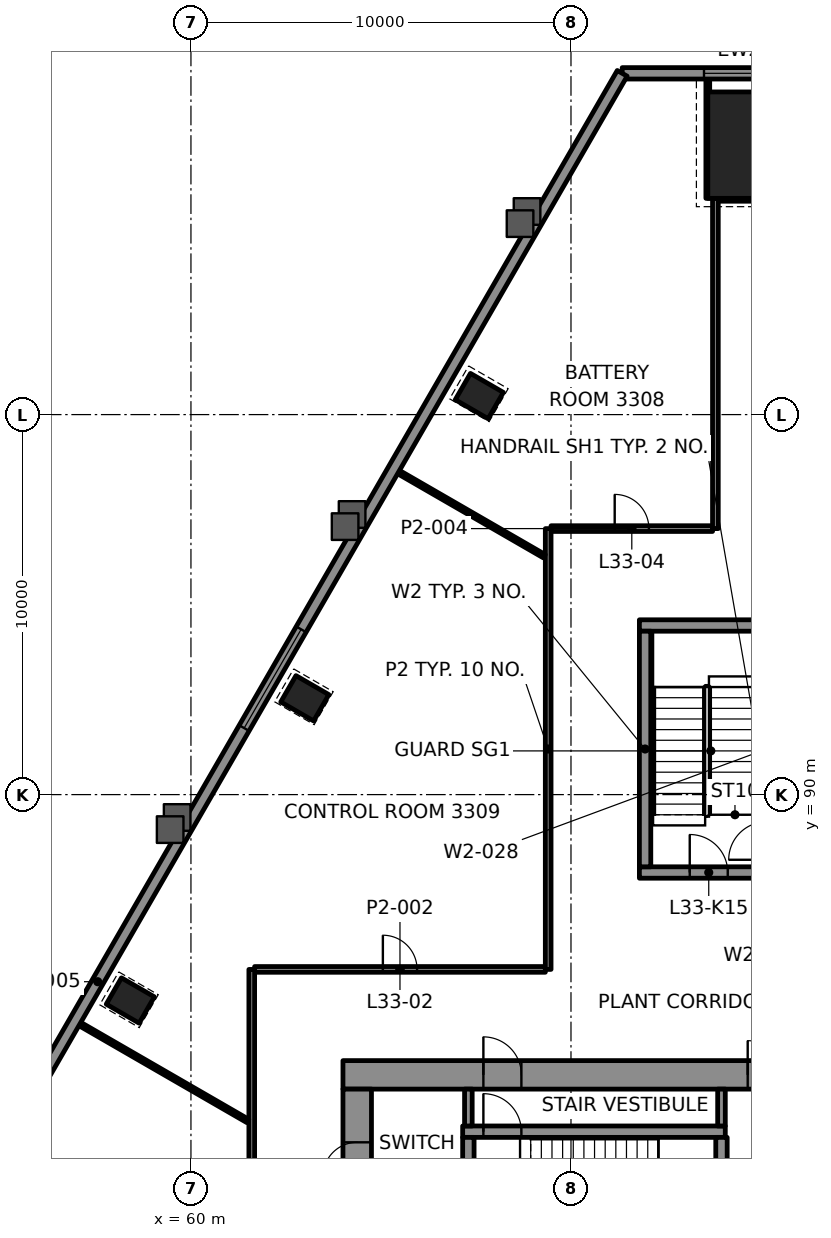
"""IFC4 building model, lengths in metres.
Left out: names, types, materials, properties, quantities, classifications, styles, units other than length and angle.
Written with IfcOpenShell. Run it as: python <this file> out.ifc"""

import sys

from ifc_helpers import new_model, si_unit, direction, frame, frame_2d, origin, origin_2d, place, context, subcontext, project, spatial, rectangle, hollow_rectangle, extrude, element, fill, save


model = new_model("IFC4")
c1 = context("Model", 3, precision=1e-05, world=origin(), true_north=direction((0.0, 1.0)))
c2 = subcontext(c1, "Body", "Model", "MODEL_VIEW")
j1 = project(units=[si_unit("LENGTHUNIT", "METRE"), si_unit("PLANEANGLEUNIT", "RADIAN")], contexts=[c1])
p1 = place(None, origin())
s1 = spatial("IfcSite", under=j1, at=p1, CompositionType="ELEMENT")
p2 = place(p1, origin())
s2 = spatial("IfcBuilding", under=s1, at=p2, CompositionType="ELEMENT")
p3 = place(p2, frame((0.0, 0.0, 146.8)))
s3 = spatial("IfcBuildingStorey", under=s2, at=p3, CompositionType="ELEMENT", Elevation=146.8)
p4 = place(p3, frame((75.0, 107.091, 0.0), z_axis=(0.0, 0.0, 1.0), x_axis=(-1.0, 0.0, 0.0)))
e1 = element("IfcColumn", 1, at=p4, inside=s3, PredefinedType="COLUMN", context=c2, shape_type="SweptSolid", body=[
    extrude(rectangle(XDim=2.8, YDim=2.8, at=origin_2d()), origin(), (0.0, 0.0, 1.0), 4.5),
])
for number, where, z_axis, x_axis in (
    (2, (67.588, 100.488, -0.0), (0.0, 0.0, 1.0), (-0.5, -0.866, 0.0)),
    (3, (62.996, 92.534, -0.0), (0.0, 0.0, 1.0), (-0.5, -0.866, 0.0)),
    (4, (58.405, 84.582, -0.0), (0.0, 0.0, 1.0), (-0.5, -0.866, 0.0)),
):
    element("IfcColumn", number, at=place(p3, frame(where, z_axis=z_axis, x_axis=x_axis)), inside=s3, PredefinedType="COLUMN", context=c2, shape_type="SweptSolid", body=[
        extrude(hollow_rectangle(XDim=0.8, YDim=1.0, WallThickness=0.05, at=origin_2d()), origin(), (0.0, 0.0, 1.0), 4.5),
    ])
p5 = place(p3, frame((64.0, 82.625, 0.0), z_axis=(0.0, 0.0, 1.0), x_axis=(1.0, 0.0, 0.0)))
e5 = element("IfcWall", 5, at=p5, inside=s3, PredefinedType="SHEAR", context=c2, shape_type="SweptSolid", body=[
    extrude(rectangle(XDim=22.0, YDim=0.75, at=frame_2d((11.0, 0.0))), origin(), (0.0, 0.0, 1.0), 4.05),
])
p6 = place(p5, frame((3.695, 0.0, 0.0)))
e6 = element("IfcOpeningElement", 6, at=p6, cuts=e5, PredefinedType="OPENING", context=c2, shape_type="SweptSolid", body=[
    extrude(rectangle(XDim=1.0, YDim=2.1, at=frame_2d((0.5, 1.05))), frame((0.0, 0.385, 0.0), z_axis=(0.0, -1.0, 0.0), x_axis=(1.0, 0.0, 0.0)), (0.0, 0.0, 1.0), 0.77),
])
p7 = place(p5, frame((17.505, 0.0, 0.0)))
e7 = element("IfcOpeningElement", 7, at=p7, cuts=e5, PredefinedType="OPENING", context=c2, shape_type="SweptSolid", body=[
    extrude(rectangle(XDim=1.0, YDim=2.1, at=frame_2d((0.5, 1.05))), frame((0.0, 0.385, 0.0), z_axis=(0.0, -1.0, 0.0), x_axis=(1.0, 0.0, 0.0)), (0.0, 0.0, 1.0), 0.77),
])
p8 = place(p5, frame((10.65, 0.0, 0.0)))
e8 = element("IfcOpeningElement", 8, at=p8, cuts=e5, PredefinedType="OPENING", context=c2, shape_type="SweptSolid", body=[
    extrude(rectangle(XDim=0.9, YDim=2.1, at=frame_2d((0.45, 1.05))), frame((0.0, 0.385, 0.0), z_axis=(0.0, -1.0, 0.0), x_axis=(1.0, 0.0, 0.0)), (0.0, 0.0, 1.0), 0.77),
])
p9 = place(p3, frame((64.375, 67.75, 0.0), z_axis=(0.0, 0.0, 1.0), x_axis=(0.0, 1.0, 0.0)))
e9 = element("IfcWall", 9, at=p9, inside=s3, PredefinedType="SHEAR", context=c2, shape_type="SweptSolid", body=[
    extrude(rectangle(XDim=14.5, YDim=0.75, at=frame_2d((7.25, 0.0))), origin(), (0.0, 0.0, 1.0), 4.05),
])
p10 = place(p9, frame((4.65, 0.0, 0.0)))
e10 = element("IfcOpeningElement", 10, at=p10, cuts=e9, PredefinedType="OPENING", context=c2, shape_type="SweptSolid", body=[
    extrude(rectangle(XDim=1.8, YDim=2.1, at=frame_2d((0.9, 1.05))), frame((0.0, 0.385, 0.0), z_axis=(0.0, -1.0, 0.0), x_axis=(1.0, 0.0, 0.0)), (0.0, 0.0, 1.0), 0.77),
])
p11 = place(p9, frame((8.5, 0.0, 0.0)))
e11 = element("IfcOpeningElement", 11, at=p11, cuts=e9, PredefinedType="OPENING", context=c2, shape_type="SweptSolid", body=[
    extrude(rectangle(XDim=0.9, YDim=2.1, at=frame_2d((0.45, 1.05))), frame((0.0, 0.385, 0.0), z_axis=(0.0, -1.0, 0.0), x_axis=(1.0, 0.0, 0.0)), (0.0, 0.0, 1.0), 0.77),
])
p12 = place(p9, frame((12.2, 0.0, 0.0)))
e12 = element("IfcOpeningElement", 12, at=p12, cuts=e9, PredefinedType="OPENING", context=c2, shape_type="SweptSolid", body=[
    extrude(rectangle(XDim=0.9, YDim=2.1, at=frame_2d((0.45, 1.05))), frame((0.0, 0.385, 0.0), z_axis=(0.0, -1.0, 0.0), x_axis=(1.0, 0.0, 0.0)), (0.0, 0.0, 1.0), 0.77),
])
p13 = place(p3, frame((67.15, 81.13, 0.0), z_axis=(0.0, 0.0, 1.0), x_axis=(1.0, 0.0, 0.0)))
e13 = element("IfcWall", 13, at=p13, inside=s3, PredefinedType="SHEAR", context=c2, shape_type="SweptSolid", body=[
    extrude(rectangle(XDim=6.91, YDim=0.3, at=frame_2d((3.455, 0.0))), origin(), (0.0, 0.0, 1.0), 4.05),
])
p14 = place(p13, frame((0.545, 0.0, 0.0)))
e14 = element("IfcOpeningElement", 14, at=p14, cuts=e13, PredefinedType="OPENING", context=c2, shape_type="SweptSolid", body=[
    extrude(rectangle(XDim=1.0, YDim=2.1, at=frame_2d((0.5, 1.05))), frame((0.0, 0.16, 0.0), z_axis=(0.0, -1.0, 0.0), x_axis=(1.0, 0.0, 0.0)), (0.0, 0.0, 1.0), 0.32),
])
for number, where, z_axis, x_axis in (
    (15, (67.3, 77.9, 0.0), (0.0, 0.0, 1.0), (0.0, 1.0, 0.0)),
    (16, (73.96, 77.9, 0.0), (0.0, 0.0, 1.0), (0.0, 1.0, 0.0)),
):
    element("IfcWall", number, at=place(p3, frame(where, z_axis=z_axis, x_axis=x_axis)), inside=s3, PredefinedType="SHEAR", context=c2, shape_type="SweptSolid", body=[
        extrude(rectangle(XDim=3.08, YDim=0.3, at=frame_2d((1.54, 0.0))), origin(), (0.0, 0.0, 1.0), 4.05),
    ])
p15 = place(p3, frame((71.8, 87.95, 0.0), z_axis=(0.0, 0.0, 1.0), x_axis=(1.0, 0.0, 0.0)))
e17 = element("IfcWall", 17, at=p15, inside=s3, PredefinedType="SHEAR", context=c2, shape_type="SweptSolid", body=[
    extrude(rectangle(XDim=6.4, YDim=0.3, at=frame_2d((3.2, 0.0))), origin(), (0.0, 0.0, 1.0), 4.05),
])
p16 = place(p15, frame((1.325, 0.0, 0.0)))
e18 = element("IfcOpeningElement", 18, at=p16, cuts=e17, PredefinedType="OPENING", context=c2, shape_type="SweptSolid", body=[
    extrude(rectangle(XDim=1.0, YDim=2.1, at=frame_2d((0.5, 1.05))), frame((0.0, 0.16, 0.0), z_axis=(0.0, -1.0, 0.0), x_axis=(1.0, 0.0, 0.0)), (0.0, 0.0, 1.0), 0.32),
])
p17 = place(p15, frame((4.125, 0.0, 0.0)))
e19 = element("IfcOpeningElement", 19, at=p17, cuts=e17, PredefinedType="OPENING", context=c2, shape_type="SweptSolid", body=[
    extrude(rectangle(XDim=1.2, YDim=2.1, at=frame_2d((0.6, 1.05))), frame((0.0, 0.16, 0.0), z_axis=(0.0, -1.0, 0.0), x_axis=(1.0, 0.0, 0.0)), (0.0, 0.0, 1.0), 0.32),
])
p18 = place(p3, frame((71.8, 94.45, 0.0), z_axis=(0.0, 0.0, 1.0), x_axis=(1.0, 0.0, 0.0)))
e20 = element("IfcWall", 20, at=p18, inside=s3, PredefinedType="SHEAR", context=c2, shape_type="SweptSolid", body=[
    extrude(rectangle(XDim=6.4, YDim=0.3, at=frame_2d((3.2, 0.0))), origin(), (0.0, 0.0, 1.0), 4.05),
])
p19 = place(p3, frame((71.95, 88.1, 0.0), z_axis=(0.0, 0.0, 1.0), x_axis=(0.0, 1.0, 0.0)))
e21 = element("IfcWall", 21, at=p19, inside=s3, PredefinedType="SHEAR", context=c2, shape_type="SweptSolid", body=[
    extrude(rectangle(XDim=6.2, YDim=0.3, at=frame_2d((3.1, 0.0))), origin(), (0.0, 0.0, 1.0), 4.05),
])
p20 = place(p3, frame((61.676, 85.4, 0.0), z_axis=(0.0, 0.0, 1.0), x_axis=(1.0, 0.0, 0.0)))
e22 = element("IfcWall", 22, at=p20, inside=s3, PredefinedType="PARTITIONING", context=c2, shape_type="SweptSolid", body=[
    extrude(rectangle(XDim=7.649, YDim=0.15, at=frame_2d((3.825, 0.0))), origin(), (0.0, 0.0, 1.0), 3.45),
])
p21 = place(p20, frame((3.375, 0.0, 0.0)))
e23 = element("IfcOpeningElement", 23, at=p21, cuts=e22, PredefinedType="OPENING", context=c2, shape_type="SweptSolid", body=[
    extrude(rectangle(XDim=0.9, YDim=2.1, at=frame_2d((0.45, 1.05))), frame((0.0, 0.085, 0.0), z_axis=(0.0, -1.0, 0.0), x_axis=(1.0, 0.0, 0.0)), (0.0, 0.0, 1.0), 0.17),
])
p22 = place(p3, frame((69.476, 97.0, 0.0), z_axis=(0.0, 0.0, 1.0), x_axis=(1.0, 0.0, 0.0)))
e24 = element("IfcWall", 24, at=p22, inside=s3, PredefinedType="PARTITIONING", context=c2, shape_type="SweptSolid", body=[
    extrude(rectangle(XDim=4.25, YDim=0.15, at=frame_2d((2.125, 0.0))), origin(), (0.0, 0.0, 1.0), 3.45),
])
p23 = place(p22, frame((1.675, 0.0, 0.0)))
e25 = element("IfcOpeningElement", 25, at=p23, cuts=e24, PredefinedType="OPENING", context=c2, shape_type="SweptSolid", body=[
    extrude(rectangle(XDim=0.9, YDim=2.1, at=frame_2d((0.45, 1.05))), frame((0.0, 0.085, 0.0), z_axis=(0.0, -1.0, 0.0), x_axis=(1.0, 0.0, 0.0)), (0.0, 0.0, 1.0), 0.17),
])
p24 = place(p3, frame((73.881, 105.69, 0.0), z_axis=(0.0, 0.0, 1.0), x_axis=(1.0, 0.0, 0.0)))
e26 = element("IfcWall", 26, at=p24, inside=s3, PredefinedType="PARTITIONING", context=c2, shape_type="SweptSolid", body=[
    extrude(rectangle(XDim=2.244, YDim=0.15, at=frame_2d((1.122, 0.0))), origin(), (0.0, 0.0, 1.0), 3.447),
])
p25 = place(p3, frame((73.8, 97.0, 0.0), z_axis=(0.0, 0.0, 1.0), x_axis=(0.0, 1.0, 0.0)))
e27 = element("IfcWall", 27, at=p25, inside=s3, PredefinedType="PARTITIONING", context=c2, shape_type="SweptSolid", body=[
    extrude(rectangle(XDim=8.69, YDim=0.15, at=frame_2d((4.345, 0.0))), origin(), (0.0, 0.0, 1.0), 3.45),
])
p26 = place(p3, frame((73.6, 105.691, 0.0), z_axis=(0.0, 0.0, 1.0), x_axis=(0.0, 1.0, 0.0)))
e28 = element("IfcWall", 28, at=p26, inside=s3, PredefinedType="PARTITIONING", context=c2, shape_type="SweptSolid", body=[
    extrude(rectangle(XDim=3.258, YDim=0.1, at=frame_2d((1.629, 0.0))), origin(), (0.0, 0.0, 1.0), 3.45),
])
p27 = place(p3, frame((69.4, 85.4, 0.0), z_axis=(0.0, 0.0, 1.0), x_axis=(0.0, 1.0, 0.0)))
e29 = element("IfcWall", 29, at=p27, inside=s3, PredefinedType="PARTITIONING", context=c2, shape_type="SweptSolid", body=[
    extrude(rectangle(XDim=11.6, YDim=0.15, at=frame_2d((5.8, 0.0))), origin(), (0.0, 0.0, 1.0), 3.372),
])
p28 = place(p3, frame((61.6, 68.649, 0.0), z_axis=(0.0, 0.0, 1.0), x_axis=(0.0, 1.0, 0.0)))
e30 = element("IfcWall", 30, at=p28, inside=s3, PredefinedType="PARTITIONING", context=c2, shape_type="SweptSolid", body=[
    extrude(rectangle(XDim=16.75, YDim=0.15, at=frame_2d((8.375, 0.0))), origin(), (0.0, 0.0, 1.0), 3.45),
])
p29 = place(p28, frame((6.722, 0.0, 0.0)))
e31 = element("IfcOpeningElement", 31, at=p29, cuts=e30, PredefinedType="OPENING", context=c2, shape_type="SweptSolid", body=[
    extrude(rectangle(XDim=0.9, YDim=2.1, at=frame_2d((0.45, 1.05))), frame((0.0, 0.085, 0.0), z_axis=(0.0, -1.0, 0.0), x_axis=(1.0, 0.0, 0.0)), (0.0, 0.0, 1.0), 0.17),
])
p30 = place(p3, frame((69.299, 96.272, 0.0), z_axis=(0.0, 0.0, 1.0), x_axis=(-0.866008641419, 0.500029032144, 0.0)))
e32 = element("IfcWall", 32, at=p30, inside=s3, PredefinedType="PARTITIONING", context=c2, shape_type="SweptSolid", body=[
    extrude(rectangle(XDim=4.55, YDim=0.1, at=frame_2d((2.275, 0.0))), origin(), (0.0, 0.0, 1.0), 3.215),
])
p31 = place(p3, frame((61.498, 81.41, 0.0), z_axis=(0.0, 0.0, 1.0), x_axis=(-0.866017510603, 0.500013671143, 0.0)))
e33 = element("IfcWall", 33, at=p31, inside=s3, PredefinedType="PARTITIONING", context=c2, shape_type="SweptSolid", body=[
    extrude(rectangle(XDim=5.225, YDim=0.1, at=frame_2d((2.612, 0.0))), origin(), (0.0, 0.0, 1.0), 3.215),
])
p32 = place(p3, frame((78.652, 108.98, 0.0), z_axis=(0.0, 0.0, 1.0), x_axis=(-1.0, 0.0, 0.0)))
e34 = element("IfcWall", 34, at=p32, inside=s3, PredefinedType="SOLIDWALL", context=c2, shape_type="SweptSolid", body=[
    extrude(rectangle(XDim=7.304, YDim=0.3, at=frame_2d((3.652, 0.0))), origin(), (0.0, 0.0, 1.0), 4.05),
])
p33 = place(p32, frame((2.152, 0.0, 0.8)))
e35 = element("IfcOpeningElement", 35, at=p33, cuts=e34, PredefinedType="OPENING", context=c2, shape_type="SweptSolid", body=[
    extrude(rectangle(XDim=3.0, YDim=2.4, at=frame_2d((1.5, 1.2))), frame((0.0, 0.16, 0.0), z_axis=(0.0, -1.0, 0.0), x_axis=(1.0, 0.0, 0.0)), (0.0, 0.0, 1.0), 0.32),
])
p34 = place(p3, frame((71.348, 108.98, 0.0), z_axis=(0.0, 0.0, 1.0), x_axis=(-0.500000383388, -0.866025182435, 0.0)))
e36 = element("IfcWall", 36, at=p34, inside=s3, PredefinedType="SOLIDWALL", context=c2, shape_type="SweptSolid", body=[
    extrude(rectangle(XDim=55.204, YDim=0.3, at=frame_2d((27.602, 0.0))), origin(), (0.0, 0.0, 1.0), 4.05),
])
p35 = place(p34, frame((16.895, 0.0, 0.8)))
e37 = element("IfcOpeningElement", 37, at=p35, cuts=e36, PredefinedType="OPENING", context=c2, shape_type="SweptSolid", body=[
    extrude(rectangle(XDim=3.0, YDim=2.4, at=frame_2d((1.5, 1.2))), frame((0.0, 0.16, 0.0), z_axis=(0.0, -1.0, 0.0), x_axis=(1.0, 0.0, 0.0)), (0.0, 0.0, 1.0), 0.32),
])
p36 = place(p34, frame((35.309, 0.0, 0.8)))
e38 = element("IfcOpeningElement", 38, at=p36, cuts=e36, PredefinedType="OPENING", context=c2, shape_type="SweptSolid", body=[
    extrude(rectangle(XDim=3.0, YDim=2.4, at=frame_2d((1.5, 1.2))), frame((0.0, 0.16, 0.0), z_axis=(0.0, -1.0, 0.0), x_axis=(1.0, 0.0, 0.0)), (0.0, 0.0, 1.0), 0.32),
])
for number, where, z_axis, x_axis in (
    (39, (67.3, 81.28, 0.0), (0.0, 0.0, 1.0), (0.0, 1.0, 0.0)),
    (40, (73.96, 81.28, 0.0), (0.0, 0.0, 1.0), (0.0, 1.0, 0.0)),
):
    element("IfcWall", number, at=place(p3, frame(where, z_axis=z_axis, x_axis=x_axis)), inside=s3, PredefinedType="PARTITIONING", context=c2, shape_type="SweptSolid", body=[
        extrude(rectangle(XDim=0.97, YDim=0.2, at=frame_2d((0.485, 0.0))), origin(), (0.0, 0.0, 1.0), 4.05),
    ])
p37 = place(p21, origin())
e41 = element("IfcDoor", 41, at=p37, inside=s3, OperationType="SINGLE_SWING_RIGHT", PredefinedType="DOOR", context=c2, shape_type="SweptSolid", body=[
    extrude(rectangle(XDim=0.9, YDim=2.1, at=frame_2d((0.45, 1.05))), frame((0.0, 0.025, 0.0), z_axis=(0.0, -1.0, 0.0), x_axis=(1.0, 0.0, 0.0)), (0.0, 0.0, 1.0), 0.05),
])
fill(e23, e41)
p38 = place(p23, origin())
e42 = element("IfcDoor", 42, at=p38, inside=s3, OperationType="SINGLE_SWING_LEFT", PredefinedType="DOOR", context=c2, shape_type="SweptSolid", body=[
    extrude(rectangle(XDim=0.9, YDim=2.1, at=frame_2d((0.45, 1.05))), frame((0.0, 0.025, 0.0), z_axis=(0.0, -1.0, 0.0), x_axis=(1.0, 0.0, 0.0)), (0.0, 0.0, 1.0), 0.05),
])
fill(e25, e42)
p39 = place(p33, origin())
e43 = element("IfcWindow", 43, at=p39, inside=s3, PartitioningType="SINGLE_PANEL", PredefinedType="WINDOW", context=c2, shape_type="SweptSolid", body=[
    extrude(rectangle(XDim=3.0, YDim=2.4, at=frame_2d((1.5, 1.2))), frame((0.0, 0.03, 0.0), z_axis=(0.0, -1.0, 0.0), x_axis=(1.0, 0.0, 0.0)), (0.0, 0.0, 1.0), 0.06),
])
fill(e35, e43)
p40 = place(p35, origin())
e44 = element("IfcWindow", 44, at=p40, inside=s3, PartitioningType="SINGLE_PANEL", PredefinedType="WINDOW", context=c2, shape_type="SweptSolid", body=[
    extrude(rectangle(XDim=3.0, YDim=2.4, at=frame_2d((1.5, 1.2))), frame((0.0, 0.03, 0.0), z_axis=(0.0, -1.0, 0.0), x_axis=(1.0, 0.0, 0.0)), (0.0, 0.0, 1.0), 0.06),
])
fill(e37, e44)
p41 = place(p14, origin())
e45 = element("IfcDoor", 45, at=p41, inside=s3, OperationType="SINGLE_SWING_RIGHT", PredefinedType="DOOR", context=c2, shape_type="SweptSolid", body=[
    extrude(rectangle(XDim=1.0, YDim=2.1, at=frame_2d((0.5, 1.05))), frame((0.0, 0.025, 0.0), z_axis=(0.0, -1.0, 0.0), x_axis=(1.0, 0.0, 0.0)), (0.0, 0.0, 1.0), 0.05),
])
fill(e14, e45)
p42 = place(p6, origin())
e46 = element("IfcDoor", 46, at=p42, inside=s3, OperationType="SINGLE_SWING_LEFT", PredefinedType="DOOR", context=c2, shape_type="SweptSolid", body=[
    extrude(rectangle(XDim=1.0, YDim=2.1, at=frame_2d((0.5, 1.05))), frame((0.0, 0.095, 0.0), z_axis=(0.0, -1.0, 0.0), x_axis=(1.0, 0.0, 0.0)), (0.0, 0.0, 1.0), 0.19),
])
fill(e6, e46)
p43 = place(p16, origin())
e47 = element("IfcDoor", 47, at=p43, inside=s3, OperationType="SINGLE_SWING_RIGHT", PredefinedType="DOOR", context=c2, shape_type="SweptSolid", body=[
    extrude(rectangle(XDim=1.0, YDim=2.1, at=frame_2d((0.5, 1.05))), frame((0.0, 0.025, 0.0), z_axis=(0.0, -1.0, 0.0), x_axis=(1.0, 0.0, 0.0)), (0.0, 0.0, 1.0), 0.05),
])
fill(e18, e47)
p44 = place(p12, origin())
e48 = element("IfcDoor", 48, at=p44, inside=s3, OperationType="SINGLE_SWING_LEFT", PredefinedType="DOOR", context=c2, shape_type="SweptSolid", body=[
    extrude(rectangle(XDim=0.9, YDim=2.1, at=frame_2d((0.45, 1.05))), frame((0.0, 0.095, 0.0), z_axis=(0.0, -1.0, 0.0), x_axis=(1.0, 0.0, 0.0)), (0.0, 0.0, 1.0), 0.19),
])
fill(e12, e48)
p45 = place(p8, origin())
e49 = element("IfcDoor", 49, at=p45, inside=s3, OperationType="SINGLE_SWING_RIGHT", PredefinedType="DOOR", context=c2, shape_type="SweptSolid", body=[
    extrude(rectangle(XDim=0.9, YDim=2.1, at=frame_2d((0.45, 1.05))), frame((0.0, 0.095, 0.0), z_axis=(0.0, -1.0, 0.0), x_axis=(1.0, 0.0, 0.0)), (0.0, 0.0, 1.0), 0.19),
])
fill(e8, e49)
save(model, sys.argv[1])
